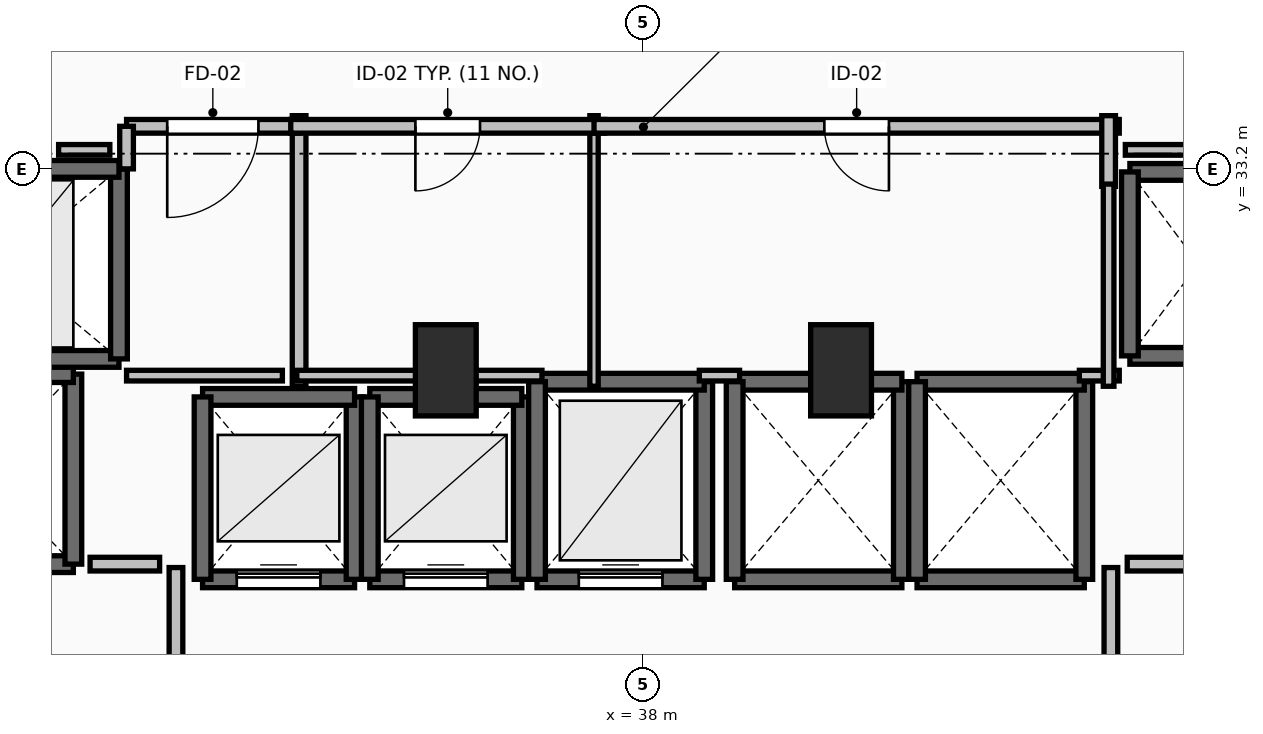
"""IFC4 building model, lengths in metres.
Left out: names, types, materials, properties, quantities, classifications, styles, units other than length and angle.
Written with IfcOpenShell. Run it as: python <this file> out.ifc"""

import sys

from ifc_helpers import new_model, si_unit, direction, frame, frame_2d, origin, origin_2d, place, context, subcontext, project, spatial, rectangle, extrude, element, fill, save


model = new_model("IFC4")
c1 = context("Model", 3, precision=1e-05, world=origin(), true_north=direction((0.0, 1.0)))
c2 = subcontext(c1, "Body", "Model", "MODEL_VIEW")
j1 = project(units=[si_unit("LENGTHUNIT", "METRE"), si_unit("PLANEANGLEUNIT", "RADIAN")], contexts=[c1])
p1 = place(None, origin())
s1 = spatial("IfcSite", under=j1, at=p1, CompositionType="ELEMENT")
p2 = place(p1, origin())
s2 = spatial("IfcBuilding", under=s1, at=p2, CompositionType="ELEMENT")
p3 = place(p2, frame((0.0, 0.0, 34.5)))
s3 = spatial("IfcBuildingStorey", under=s2, at=p3, CompositionType="ELEMENT", Elevation=34.5)
for number, where, z_axis, x_axis in (
    (1, (35.4, 30.55, 0.0), (0.0, 0.0, 1.0), (1.0, 0.0, 0.0)),
    (2, (40.6, 30.55, 0.0), (0.0, 0.0, 1.0), (1.0, 0.0, 0.0)),
):
    element("IfcColumn", number, at=place(p3, frame(where, z_axis=z_axis, x_axis=x_axis)), inside=s3, PredefinedType="PILASTER", context=c2, shape_type="SweptSolid", body=[
        extrude(rectangle(XDim=0.8, YDim=1.2, at=origin_2d()), origin(), (0.0, 0.0, 1.0), 3.5),
    ])
p4 = place(p3, frame((32.2, 27.8, 0.0), z_axis=(0.0, 0.0, 1.0), x_axis=(1.0, 0.0, 0.0)))
e3 = element("IfcWall", 3, at=p4, inside=s3, PredefinedType="SOLIDWALL", context=c2, shape_type="SweptSolid", body=[
    extrude(rectangle(XDim=2.0, YDim=0.22, at=frame_2d((1.0, 0.0))), origin(), (0.0, 0.0, 1.0), 3.24),
])
p5 = place(p4, frame((0.45, 0.0, 0.0)))
e4 = element("IfcOpeningElement", 4, at=p5, cuts=e3, PredefinedType="OPENING", context=c2, shape_type="SweptSolid", body=[
    extrude(rectangle(XDim=1.1, YDim=2.2, at=frame_2d((0.55, 1.1))), frame((0.0, 0.125, 0.0), z_axis=(0.0, -1.0, 0.0), x_axis=(1.0, 0.0, 0.0)), (0.0, 0.0, 1.0), 0.25),
])
p6 = place(p3, frame((34.2, 27.8, 0.0), z_axis=(0.0, 0.0, 1.0), x_axis=(0.0, 1.0, 0.0)))
e5 = element("IfcWall", 5, at=p6, inside=s3, PredefinedType="SOLIDWALL", context=c2, shape_type="SweptSolid", body=[
    extrude(rectangle(XDim=2.4, YDim=0.22, at=frame_2d((1.2, 0.0))), origin(), (0.0, 0.0, 1.0), 3.24),
])
p7 = place(p3, frame((34.2, 30.2, 0.0), z_axis=(0.0, 0.0, 1.0), x_axis=(-1.0, 0.0, 0.0)))
e6 = element("IfcWall", 6, at=p7, inside=s3, PredefinedType="SOLIDWALL", context=c2, shape_type="SweptSolid", body=[
    extrude(rectangle(XDim=2.0, YDim=0.22, at=frame_2d((1.0, 0.0))), origin(), (0.0, 0.0, 1.0), 3.24),
])
p8 = place(p3, frame((32.2, 30.2, 0.0), z_axis=(0.0, 0.0, 1.0), x_axis=(0.0, -1.0, 0.0)))
e7 = element("IfcWall", 7, at=p8, inside=s3, PredefinedType="SOLIDWALL", context=c2, shape_type="SweptSolid", body=[
    extrude(rectangle(XDim=2.4, YDim=0.22, at=frame_2d((1.2, 0.0))), origin(), (0.0, 0.0, 1.0), 3.24),
])
p9 = place(p3, frame((34.4, 27.8, 0.0), z_axis=(0.0, 0.0, 1.0), x_axis=(1.0, 0.0, 0.0)))
e8 = element("IfcWall", 8, at=p9, inside=s3, PredefinedType="SOLIDWALL", context=c2, shape_type="SweptSolid", body=[
    extrude(rectangle(XDim=2.0, YDim=0.22, at=frame_2d((1.0, 0.0))), origin(), (0.0, 0.0, 1.0), 3.24),
])
p10 = place(p9, frame((0.45, 0.0, 0.0)))
e9 = element("IfcOpeningElement", 9, at=p10, cuts=e8, PredefinedType="OPENING", context=c2, shape_type="SweptSolid", body=[
    extrude(rectangle(XDim=1.1, YDim=2.2, at=frame_2d((0.55, 1.1))), frame((0.0, 0.125, 0.0), z_axis=(0.0, -1.0, 0.0), x_axis=(1.0, 0.0, 0.0)), (0.0, 0.0, 1.0), 0.25),
])
p11 = place(p3, frame((36.4, 27.8, 0.0), z_axis=(0.0, 0.0, 1.0), x_axis=(0.0, 1.0, 0.0)))
e10 = element("IfcWall", 10, at=p11, inside=s3, PredefinedType="SOLIDWALL", context=c2, shape_type="SweptSolid", body=[
    extrude(rectangle(XDim=2.4, YDim=0.22, at=frame_2d((1.2, 0.0))), origin(), (0.0, 0.0, 1.0), 3.24),
])
p12 = place(p3, frame((36.4, 30.2, 0.0), z_axis=(0.0, 0.0, 1.0), x_axis=(-1.0, 0.0, 0.0)))
e11 = element("IfcWall", 11, at=p12, inside=s3, PredefinedType="SOLIDWALL", context=c2, shape_type="SweptSolid", body=[
    extrude(rectangle(XDim=2.0, YDim=0.22, at=frame_2d((1.0, 0.0))), origin(), (0.0, 0.0, 1.0), 3.24),
])
p13 = place(p3, frame((34.4, 30.2, 0.0), z_axis=(0.0, 0.0, 1.0), x_axis=(0.0, -1.0, 0.0)))
e12 = element("IfcWall", 12, at=p13, inside=s3, PredefinedType="SOLIDWALL", context=c2, shape_type="SweptSolid", body=[
    extrude(rectangle(XDim=2.4, YDim=0.22, at=frame_2d((1.2, 0.0))), origin(), (0.0, 0.0, 1.0), 3.24),
])
p14 = place(p3, frame((36.6, 27.8, 0.0), z_axis=(0.0, 0.0, 1.0), x_axis=(1.0, 0.0, 0.0)))
e13 = element("IfcWall", 13, at=p14, inside=s3, PredefinedType="SOLIDWALL", context=c2, shape_type="SweptSolid", body=[
    extrude(rectangle(XDim=2.2, YDim=0.22, at=frame_2d((1.1, 0.0))), origin(), (0.0, 0.0, 1.0), 3.24),
])
p15 = place(p14, frame((0.55, 0.0, 0.0)))
e14 = element("IfcOpeningElement", 14, at=p15, cuts=e13, PredefinedType="OPENING", context=c2, shape_type="SweptSolid", body=[
    extrude(rectangle(XDim=1.1, YDim=2.2, at=frame_2d((0.55, 1.1))), frame((0.0, 0.125, 0.0), z_axis=(0.0, -1.0, 0.0), x_axis=(1.0, 0.0, 0.0)), (0.0, 0.0, 1.0), 0.25),
])
p16 = place(p3, frame((38.8, 27.8, 0.0), z_axis=(0.0, 0.0, 1.0), x_axis=(0.0, 1.0, 0.0)))
e15 = element("IfcWall", 15, at=p16, inside=s3, PredefinedType="SOLIDWALL", context=c2, shape_type="SweptSolid", body=[
    extrude(rectangle(XDim=2.6, YDim=0.22, at=frame_2d((1.3, 0.0))), origin(), (0.0, 0.0, 1.0), 3.24),
])
p17 = place(p3, frame((38.8, 30.4, 0.0), z_axis=(0.0, 0.0, 1.0), x_axis=(-1.0, 0.0, 0.0)))
e16 = element("IfcWall", 16, at=p17, inside=s3, PredefinedType="SOLIDWALL", context=c2, shape_type="SweptSolid", body=[
    extrude(rectangle(XDim=2.2, YDim=0.22, at=frame_2d((1.1, 0.0))), origin(), (0.0, 0.0, 1.0), 3.24),
])
p18 = place(p3, frame((36.6, 30.4, 0.0), z_axis=(0.0, 0.0, 1.0), x_axis=(0.0, -1.0, 0.0)))
e17 = element("IfcWall", 17, at=p18, inside=s3, PredefinedType="SOLIDWALL", context=c2, shape_type="SweptSolid", body=[
    extrude(rectangle(XDim=2.6, YDim=0.22, at=frame_2d((1.3, 0.0))), origin(), (0.0, 0.0, 1.0), 3.24),
])
p19 = place(p3, frame((39.2, 27.8, 0.0), z_axis=(0.0, 0.0, 1.0), x_axis=(1.0, 0.0, 0.0)))
e18 = element("IfcWall", 18, at=p19, inside=s3, PredefinedType="SOLIDWALL", context=c2, shape_type="SweptSolid", body=[
    extrude(rectangle(XDim=2.2, YDim=0.22, at=frame_2d((1.1, 0.0))), origin(), (0.0, 0.0, 1.0), 3.24),
])
p20 = place(p3, frame((41.4, 27.8, 0.0), z_axis=(0.0, 0.0, 1.0), x_axis=(0.0, 1.0, 0.0)))
e19 = element("IfcWall", 19, at=p20, inside=s3, PredefinedType="SOLIDWALL", context=c2, shape_type="SweptSolid", body=[
    extrude(rectangle(XDim=2.6, YDim=0.22, at=frame_2d((1.3, 0.0))), origin(), (0.0, 0.0, 1.0), 3.24),
])
p21 = place(p3, frame((41.4, 30.4, 0.0), z_axis=(0.0, 0.0, 1.0), x_axis=(-1.0, 0.0, 0.0)))
e20 = element("IfcWall", 20, at=p21, inside=s3, PredefinedType="SOLIDWALL", context=c2, shape_type="SweptSolid", body=[
    extrude(rectangle(XDim=2.2, YDim=0.22, at=frame_2d((1.1, 0.0))), origin(), (0.0, 0.0, 1.0), 3.24),
])
p22 = place(p3, frame((39.2, 30.4, 0.0), z_axis=(0.0, 0.0, 1.0), x_axis=(0.0, -1.0, 0.0)))
e21 = element("IfcWall", 21, at=p22, inside=s3, PredefinedType="SOLIDWALL", context=c2, shape_type="SweptSolid", body=[
    extrude(rectangle(XDim=2.6, YDim=0.22, at=frame_2d((1.3, 0.0))), origin(), (0.0, 0.0, 1.0), 3.24),
])
p23 = place(p3, frame((41.6, 27.8, 0.0), z_axis=(0.0, 0.0, 1.0), x_axis=(1.0, 0.0, 0.0)))
e22 = element("IfcWall", 22, at=p23, inside=s3, PredefinedType="SOLIDWALL", context=c2, shape_type="SweptSolid", body=[
    extrude(rectangle(XDim=2.2, YDim=0.22, at=frame_2d((1.1, 0.0))), origin(), (0.0, 0.0, 1.0), 3.24),
])
p24 = place(p3, frame((43.8, 27.8, 0.0), z_axis=(0.0, 0.0, 1.0), x_axis=(0.0, 1.0, 0.0)))
e23 = element("IfcWall", 23, at=p24, inside=s3, PredefinedType="SOLIDWALL", context=c2, shape_type="SweptSolid", body=[
    extrude(rectangle(XDim=2.6, YDim=0.22, at=frame_2d((1.3, 0.0))), origin(), (0.0, 0.0, 1.0), 3.24),
])
p25 = place(p3, frame((43.8, 30.4, 0.0), z_axis=(0.0, 0.0, 1.0), x_axis=(-1.0, 0.0, 0.0)))
e24 = element("IfcWall", 24, at=p25, inside=s3, PredefinedType="SOLIDWALL", context=c2, shape_type="SweptSolid", body=[
    extrude(rectangle(XDim=2.2, YDim=0.22, at=frame_2d((1.1, 0.0))), origin(), (0.0, 0.0, 1.0), 3.24),
])
p26 = place(p3, frame((41.6, 30.4, 0.0), z_axis=(0.0, 0.0, 1.0), x_axis=(0.0, -1.0, 0.0)))
e25 = element("IfcWall", 25, at=p26, inside=s3, PredefinedType="SOLIDWALL", context=c2, shape_type="SweptSolid", body=[
    extrude(rectangle(XDim=2.6, YDim=0.22, at=frame_2d((1.3, 0.0))), origin(), (0.0, 0.0, 1.0), 3.24),
])
for number, where, z_axis, x_axis in (
    (26, (44.4, 30.74, 0.0), (0.0, 0.0, 1.0), (1.0, 0.0, 0.0)),
    (27, (46.2, 33.16, 0.0), (0.0, 0.0, 1.0), (-1.0, 0.0, 0.0)),
):
    element("IfcWall", number, at=place(p3, frame(where, z_axis=z_axis, x_axis=x_axis)), inside=s3, PredefinedType="SOLIDWALL", context=c2, shape_type="SweptSolid", body=[
        extrude(rectangle(XDim=1.8, YDim=0.22, at=frame_2d((0.9, 0.0))), origin(), (0.0, 0.0, 1.0), 3.24),
    ])
p27 = place(p3, frame((44.4, 33.16, 0.0), z_axis=(0.0, 0.0, 1.0), x_axis=(0.0, -1.0, 0.0)))
e28 = element("IfcWall", 28, at=p27, inside=s3, PredefinedType="SOLIDWALL", context=c2, shape_type="SweptSolid", body=[
    extrude(rectangle(XDim=2.42, YDim=0.22, at=frame_2d((1.21, 0.0))), origin(), (0.0, 0.0, 1.0), 3.24),
])
p28 = place(p3, frame((28.1, 28.0, 0.0), z_axis=(0.0, 0.0, 1.0), x_axis=(1.0, 0.0, 0.0)))
e29 = element("IfcWall", 29, at=p28, inside=s3, PredefinedType="SHEAR", context=c2, shape_type="SweptSolid", body=[
    extrude(rectangle(XDim=2.4, YDim=0.22, at=frame_2d((1.2, 0.0))), origin(), (0.0, 0.0, 1.0), 3.24),
])
p29 = place(p28, frame((0.6, 0.0, 0.0)))
e30 = element("IfcOpeningElement", 30, at=p29, cuts=e29, PredefinedType="OPENING", context=c2, shape_type="SweptSolid", body=[
    extrude(rectangle(XDim=1.2, YDim=2.2, at=frame_2d((0.6, 1.1))), frame((0.0, 0.125, 0.0), z_axis=(0.0, -1.0, 0.0), x_axis=(1.0, 0.0, 0.0)), (0.0, 0.0, 1.0), 0.25),
])
p30 = place(p3, frame((30.5, 28.0, 0.0), z_axis=(0.0, 0.0, 1.0), x_axis=(0.0, 1.0, 0.0)))
e31 = element("IfcWall", 31, at=p30, inside=s3, PredefinedType="SHEAR", context=c2, shape_type="SweptSolid", body=[
    extrude(rectangle(XDim=2.5, YDim=0.22, at=frame_2d((1.25, 0.0))), origin(), (0.0, 0.0, 1.0), 3.24),
])
p31 = place(p3, frame((30.5, 30.5, 0.0), z_axis=(0.0, 0.0, 1.0), x_axis=(-1.0, 0.0, 0.0)))
e32 = element("IfcWall", 32, at=p31, inside=s3, PredefinedType="SHEAR", context=c2, shape_type="SweptSolid", body=[
    extrude(rectangle(XDim=2.4, YDim=0.22, at=frame_2d((1.2, 0.0))), origin(), (0.0, 0.0, 1.0), 3.24),
])
p32 = place(p3, frame((28.1, 30.7, 0.0), z_axis=(0.0, 0.0, 1.0), x_axis=(1.0, 0.0, 0.0)))
e33 = element("IfcWall", 33, at=p32, inside=s3, PredefinedType="SOLIDWALL", context=c2, shape_type="SweptSolid", body=[
    extrude(rectangle(XDim=3.0, YDim=0.22, at=frame_2d((1.5, 0.0))), origin(), (0.0, 0.0, 1.0), 3.24),
])
p33 = place(p3, frame((31.1, 30.7, 0.0), z_axis=(0.0, 0.0, 1.0), x_axis=(0.0, 1.0, 0.0)))
e34 = element("IfcWall", 34, at=p33, inside=s3, PredefinedType="SOLIDWALL", context=c2, shape_type="SweptSolid", body=[
    extrude(rectangle(XDim=2.5, YDim=0.22, at=frame_2d((1.25, 0.0))), origin(), (0.0, 0.0, 1.0), 3.24),
])
p34 = place(p3, frame((31.1, 33.2, 0.0), z_axis=(0.0, 0.0, 1.0), x_axis=(-1.0, 0.0, 0.0)))
e35 = element("IfcWall", 35, at=p34, inside=s3, PredefinedType="SOLIDWALL", context=c2, shape_type="SweptSolid", body=[
    extrude(rectangle(XDim=3.0, YDim=0.22, at=frame_2d((1.5, 0.0))), origin(), (0.0, 0.0, 1.0), 3.24),
])
p35 = place(p34, frame((0.9, 0.0, 0.0)))
e36 = element("IfcOpeningElement", 36, at=p35, cuts=e35, PredefinedType="OPENING", context=c2, shape_type="SweptSolid", body=[
    extrude(rectangle(XDim=1.2, YDim=2.2, at=frame_2d((0.6, 1.1))), frame((0.0, 0.125, 0.0), z_axis=(0.0, -1.0, 0.0), x_axis=(1.0, 0.0, 0.0)), (0.0, 0.0, 1.0), 0.25),
])
p36 = place(p3, frame((31.85, 24.045, 0.0), z_axis=(0.0, 0.0, 1.0), x_axis=(0.0, 1.0, 0.0)))
e37 = element("IfcWall", 37, at=p36, inside=s3, PredefinedType="PARTITIONING", context=c2, shape_type="SweptSolid", body=[
    extrude(rectangle(XDim=3.91, YDim=0.18, at=frame_2d((1.955, 0.0))), origin(), (0.0, 0.0, 1.0), 3.24),
])
p37 = place(p36, frame((1.355, 0.0, 0.0)))
e38 = element("IfcOpeningElement", 38, at=p37, cuts=e37, PredefinedType="OPENING", context=c2, shape_type="SweptSolid", body=[
    extrude(rectangle(XDim=1.2, YDim=2.15, at=frame_2d((0.6, 1.075))), frame((0.0, 0.105, 0.0), z_axis=(0.0, -1.0, 0.0), x_axis=(1.0, 0.0, 0.0)), (0.0, 0.0, 1.0), 0.21),
])
p38 = place(p3, frame((44.15, 27.955, 0.0), z_axis=(0.0, 0.0, 1.0), x_axis=(0.0, -1.0, 0.0)))
e39 = element("IfcWall", 39, at=p38, inside=s3, PredefinedType="PARTITIONING", context=c2, shape_type="SweptSolid", body=[
    extrude(rectangle(XDim=3.91, YDim=0.18, at=frame_2d((1.955, 0.0))), origin(), (0.0, 0.0, 1.0), 3.24),
])
p39 = place(p38, frame((1.355, 0.0, 0.0)))
e40 = element("IfcOpeningElement", 40, at=p39, cuts=e39, PredefinedType="OPENING", context=c2, shape_type="SweptSolid", body=[
    extrude(rectangle(XDim=1.2, YDim=2.15, at=frame_2d((0.6, 1.075))), frame((0.0, 0.105, 0.0), z_axis=(0.0, -1.0, 0.0), x_axis=(1.0, 0.0, 0.0)), (0.0, 0.0, 1.0), 0.21),
])
p40 = place(p3, frame((33.47, 30.34, 0.0), z_axis=(0.0, 0.0, 1.0), x_axis=(0.0, 1.0, 0.0)))
e41 = element("IfcWall", 41, at=p40, inside=s3, PredefinedType="PARTITIONING", context=c2, shape_type="SweptSolid", body=[
    extrude(rectangle(XDim=3.56, YDim=0.18, at=frame_2d((1.78, 0.0))), origin(), (0.0, 0.0, 1.0), 3.24),
])
p41 = place(p3, frame((33.47, 33.76, 0.0), z_axis=(0.0, 0.0, 1.0), x_axis=(-1.0, 0.0, 0.0)))
e42 = element("IfcWall", 42, at=p41, inside=s3, PredefinedType="PARTITIONING", context=c2, shape_type="SweptSolid", body=[
    extrude(rectangle(XDim=2.27, YDim=0.18, at=frame_2d((1.135, 0.0))), origin(), (0.0, 0.0, 1.0), 3.24),
])
p42 = place(p41, frame((0.535, 0.0, 0.0)))
e43 = element("IfcOpeningElement", 43, at=p42, cuts=e42, PredefinedType="OPENING", context=c2, shape_type="SweptSolid", body=[
    extrude(rectangle(XDim=1.2, YDim=2.15, at=frame_2d((0.6, 1.075))), frame((0.0, 0.105, 0.0), z_axis=(0.0, -1.0, 0.0), x_axis=(1.0, 0.0, 0.0)), (0.0, 0.0, 1.0), 0.21),
])
p43 = place(p3, frame((31.2, 33.76, 0.0), z_axis=(0.0, 0.0, 1.0), x_axis=(0.0, -1.0, 0.0)))
e44 = element("IfcWall", 44, at=p43, inside=s3, PredefinedType="PARTITIONING", context=c2, shape_type="SweptSolid", body=[
    extrude(rectangle(XDim=0.56, YDim=0.18, at=frame_2d((0.28, 0.0))), origin(), (0.0, 0.0, 1.0), 3.24),
])
p44 = place(p3, frame((37.35, 30.34, 0.0), z_axis=(0.0, 0.0, 1.0), x_axis=(0.0, 1.0, 0.0)))
e45 = element("IfcWall", 45, at=p44, inside=s3, PredefinedType="PARTITIONING", context=c2, shape_type="SweptSolid", body=[
    extrude(rectangle(XDim=3.56, YDim=0.11, at=frame_2d((1.78, 0.0))), origin(), (0.0, 0.0, 1.0), 2.432),
])
p45 = place(p3, frame((37.49, 33.76, 0.0), z_axis=(0.0, 0.0, 1.0), x_axis=(-1.0, 0.0, 0.0)))
e46 = element("IfcWall", 46, at=p45, inside=s3, PredefinedType="PARTITIONING", context=c2, shape_type="SweptSolid", body=[
    extrude(rectangle(XDim=4.13, YDim=0.18, at=frame_2d((2.065, 0.0))), origin(), (0.0, 0.0, 1.0), 3.24),
])
p46 = place(p45, frame((1.64, 0.0, 0.0)))
e47 = element("IfcOpeningElement", 47, at=p46, cuts=e46, PredefinedType="OPENING", context=c2, shape_type="SweptSolid", body=[
    extrude(rectangle(XDim=0.85, YDim=2.1, at=frame_2d((0.425, 1.05))), frame((0.0, 0.105, 0.0), z_axis=(0.0, -1.0, 0.0), x_axis=(1.0, 0.0, 0.0)), (0.0, 0.0, 1.0), 0.21),
])
p47 = place(p3, frame((44.26, 33.76, 0.0), z_axis=(0.0, 0.0, 1.0), x_axis=(-1.0, 0.0, 0.0)))
e48 = element("IfcWall", 48, at=p47, inside=s3, PredefinedType="PARTITIONING", context=c2, shape_type="SweptSolid", body=[
    extrude(rectangle(XDim=6.91, YDim=0.18, at=frame_2d((3.455, 0.0))), origin(), (0.0, 0.0, 1.0), 3.24),
])
p48 = place(p47, frame((3.03, 0.0, 0.0)))
e49 = element("IfcOpeningElement", 49, at=p48, cuts=e48, PredefinedType="OPENING", context=c2, shape_type="SweptSolid", body=[
    extrude(rectangle(XDim=0.85, YDim=2.1, at=frame_2d((0.425, 1.05))), frame((0.0, 0.105, 0.0), z_axis=(0.0, -1.0, 0.0), x_axis=(1.0, 0.0, 0.0)), (0.0, 0.0, 1.0), 0.21),
])
p49 = place(p3, frame((44.12, 32.97, 0.0), z_axis=(0.0, 0.0, 1.0), x_axis=(0.0, 1.0, 0.0)))
e50 = element("IfcWall", 50, at=p49, inside=s3, PredefinedType="PARTITIONING", context=c2, shape_type="SweptSolid", body=[
    extrude(rectangle(XDim=0.93, YDim=0.18, at=frame_2d((0.465, 0.0))), origin(), (0.0, 0.0, 1.0), 3.24),
])
for number, where, z_axis, x_axis in (
    (51, (31.635, 28.0, 0.0), (0.0, 0.0, 1.0), (-1.0, 0.0, 0.0)),
    (52, (45.28, 28.0, 0.0), (0.0, 0.0, 1.0), (-1.0, 0.0, 0.0)),
):
    element("IfcWall", number, at=place(p3, frame(where, z_axis=z_axis, x_axis=x_axis)), inside=s3, PredefinedType="PARTITIONING", context=c2, shape_type="SweptSolid", body=[
        extrude(rectangle(XDim=0.915, YDim=0.18, at=frame_2d((0.458, 0.0))), origin(), (0.0, 0.0, 1.0), 3.24),
    ])
p50 = place(p3, frame((31.2, 30.48, 0.0), z_axis=(0.0, 0.0, 1.0), x_axis=(1.0, 0.0, 0.0)))
e53 = element("IfcWall", 53, at=p50, inside=s3, PredefinedType="PARTITIONING", context=c2, shape_type="SweptSolid", body=[
    extrude(rectangle(XDim=2.05, YDim=0.14, at=frame_2d((1.025, 0.0))), origin(), (0.0, 0.0, 1.0), 3.24),
])
p51 = place(p3, frame((33.44, 30.48, 0.0), z_axis=(0.0, 0.0, 1.0), x_axis=(1.0, 0.0, 0.0)))
e54 = element("IfcWall", 54, at=p51, inside=s3, PredefinedType="PARTITIONING", context=c2, shape_type="SweptSolid", body=[
    extrude(rectangle(XDim=3.225, YDim=0.14, at=frame_2d((1.613, 0.0))), origin(), (0.0, 0.0, 1.0), 2.432),
])
p52 = place(p3, frame((38.735, 30.48, 0.0), z_axis=(0.0, 0.0, 1.0), x_axis=(1.0, 0.0, 0.0)))
e55 = element("IfcWall", 55, at=p52, inside=s3, PredefinedType="PARTITIONING", context=c2, shape_type="SweptSolid", body=[
    extrude(rectangle(XDim=0.53, YDim=0.14, at=frame_2d((0.265, 0.0))), origin(), (0.0, 0.0, 1.0), 2.432),
])
p53 = place(p3, frame((43.735, 30.48, 0.0), z_axis=(0.0, 0.0, 1.0), x_axis=(1.0, 0.0, 0.0)))
e56 = element("IfcWall", 56, at=p53, inside=s3, PredefinedType="PARTITIONING", context=c2, shape_type="SweptSolid", body=[
    extrude(rectangle(XDim=0.525, YDim=0.14, at=frame_2d((0.262, 0.0))), origin(), (0.0, 0.0, 1.0), 3.24),
])
p54 = place(p3, frame((44.12, 30.34, 0.0), z_axis=(0.0, 0.0, 1.0), x_axis=(0.0, 1.0, 0.0)))
e57 = element("IfcWall", 57, at=p54, inside=s3, PredefinedType="PARTITIONING", context=c2, shape_type="SweptSolid", body=[
    extrude(rectangle(XDim=2.66, YDim=0.14, at=frame_2d((1.33, 0.0))), origin(), (0.0, 0.0, 1.0), 3.24),
])
p55 = place(p3, frame((44.34, 33.45, 0.0), z_axis=(0.0, 0.0, 1.0), x_axis=(1.0, 0.0, 0.0)))
e58 = element("IfcWall", 58, at=p55, inside=s3, PredefinedType="PARTITIONING", context=c2, shape_type="SweptSolid", body=[
    extrude(rectangle(XDim=4.21, YDim=0.14, at=frame_2d((2.105, 0.0))), origin(), (0.0, 0.0, 1.0), 2.432),
])
p56 = place(p3, frame((30.306, 33.45, 0.0), z_axis=(0.0, 0.0, 1.0), x_axis=(1.0, 0.0, 0.0)))
e59 = element("IfcWall", 59, at=p56, inside=s3, PredefinedType="PARTITIONING", context=c2, shape_type="SweptSolid", body=[
    extrude(rectangle(XDim=0.674, YDim=0.14, at=frame_2d((0.337, 0.0))), origin(), (0.0, 0.0, 1.0), 3.24),
])
p57 = place(p5, origin())
e60 = element("IfcDoor", 60, at=p57, inside=s3, OperationType="SLIDING_TO_LEFT", PredefinedType="DOOR", context=c2, shape_type="SweptSolid", body=[
    extrude(rectangle(XDim=1.1, YDim=2.2, at=frame_2d((0.55, 1.1))), frame((0.0, 0.025, 0.0), z_axis=(0.0, -1.0, 0.0), x_axis=(1.0, 0.0, 0.0)), (0.0, 0.0, 1.0), 0.05),
])
fill(e4, e60)
p58 = place(p10, origin())
e61 = element("IfcDoor", 61, at=p58, inside=s3, OperationType="SLIDING_TO_LEFT", PredefinedType="DOOR", context=c2, shape_type="SweptSolid", body=[
    extrude(rectangle(XDim=1.1, YDim=2.2, at=frame_2d((0.55, 1.1))), frame((0.0, 0.025, 0.0), z_axis=(0.0, -1.0, 0.0), x_axis=(1.0, 0.0, 0.0)), (0.0, 0.0, 1.0), 0.05),
])
fill(e9, e61)
p59 = place(p15, origin())
e62 = element("IfcDoor", 62, at=p59, inside=s3, OperationType="SLIDING_TO_LEFT", PredefinedType="DOOR", context=c2, shape_type="SweptSolid", body=[
    extrude(rectangle(XDim=1.1, YDim=2.2, at=frame_2d((0.55, 1.1))), frame((0.0, 0.025, 0.0), z_axis=(0.0, -1.0, 0.0), x_axis=(1.0, 0.0, 0.0)), (0.0, 0.0, 1.0), 0.05),
])
fill(e14, e62)
p60 = place(p42, origin())
e63 = element("IfcDoor", 63, at=p60, inside=s3, OperationType="SINGLE_SWING_RIGHT", PredefinedType="DOOR", context=c2, shape_type="SweptSolid", body=[
    extrude(rectangle(XDim=1.2, YDim=2.15, at=frame_2d((0.6, 1.075))), frame((0.0, 0.025, 0.0), z_axis=(0.0, -1.0, 0.0), x_axis=(1.0, 0.0, 0.0)), (0.0, 0.0, 1.0), 0.05),
])
fill(e43, e63)
p61 = place(p46, origin())
e64 = element("IfcDoor", 64, at=p61, inside=s3, OperationType="SINGLE_SWING_RIGHT", PredefinedType="DOOR", context=c2, shape_type="SweptSolid", body=[
    extrude(rectangle(XDim=0.85, YDim=2.1, at=frame_2d((0.425, 1.05))), frame((0.0, 0.025, 0.0), z_axis=(0.0, -1.0, 0.0), x_axis=(1.0, 0.0, 0.0)), (0.0, 0.0, 1.0), 0.05),
])
fill(e47, e64)
p62 = place(p48, origin())
e65 = element("IfcDoor", 65, at=p62, inside=s3, OperationType="SINGLE_SWING_LEFT", PredefinedType="DOOR", context=c2, shape_type="SweptSolid", body=[
    extrude(rectangle(XDim=0.85, YDim=2.1, at=frame_2d((0.425, 1.05))), frame((0.0, 0.025, 0.0), z_axis=(0.0, -1.0, 0.0), x_axis=(1.0, 0.0, 0.0)), (0.0, 0.0, 1.0), 0.05),
])
fill(e49, e65)
save(model, sys.argv[1])
